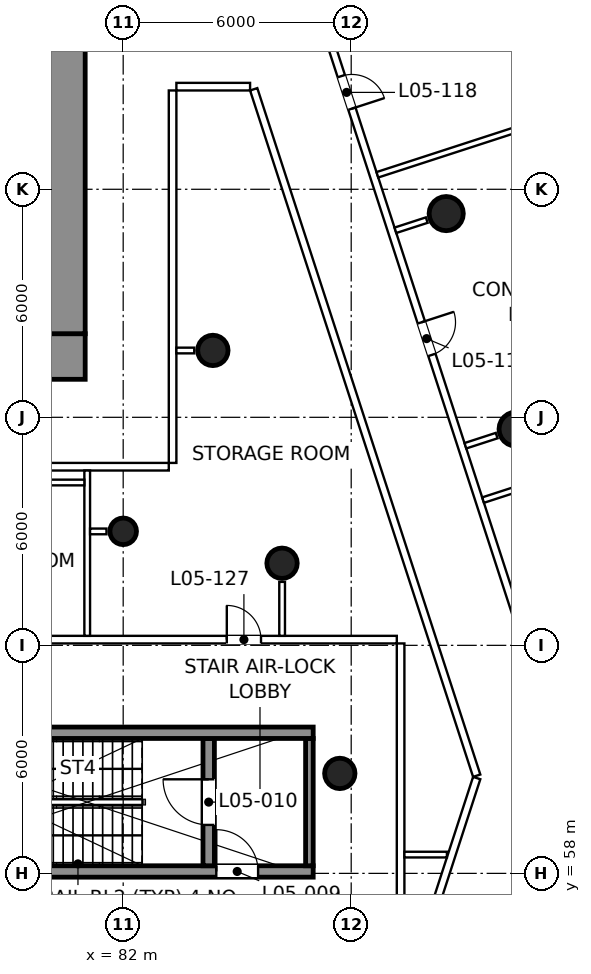
"""IFC4 building model, lengths in metres.
Left out: names, types, materials, properties, quantities, classifications, styles, units other than length and angle.
Written with IfcOpenShell. Run it as: python <this file> out.ifc"""

import sys

from ifc_helpers import new_model, si_unit, direction, frame, frame_2d, origin, origin_2d, place, context, subcontext, project, spatial, rectangle, circle, extrude, element, fill, save


model = new_model("IFC4")
c1 = context("Model", 3, precision=1e-05, world=origin(), true_north=direction((0.0, 1.0)))
c2 = subcontext(c1, "Body", "Model", "MODEL_VIEW")
j1 = project(units=[si_unit("LENGTHUNIT", "METRE"), si_unit("PLANEANGLEUNIT", "RADIAN")], contexts=[c1])
p1 = place(None, origin())
s1 = spatial("IfcSite", under=j1, at=p1, CompositionType="ELEMENT")
p2 = place(p1, origin())
s2 = spatial("IfcBuilding", under=s1, at=p2, CompositionType="ELEMENT")
p3 = place(p2, frame((0.0, 0.0, 34.0)))
s3 = spatial("IfcBuildingStorey", under=s2, at=p3, CompositionType="ELEMENT", Elevation=34.0)
for number, where, z_axis, x_axis in (
    (1, (92.34, 69.69, 0.0), (0.0, 0.0, 1.0), (1.0, 0.0, 0.0)),
    (2, (90.5, 75.36, 0.0), (0.0, 0.0, 1.0), (1.0, 0.0, 0.0)),
):
    element("IfcColumn", number, at=place(p3, frame(where, z_axis=z_axis, x_axis=x_axis)), inside=s3, PredefinedType="COLUMN", context=c2, shape_type="SweptSolid", body=[
        extrude(circle(Radius=0.45, at=origin_2d()), origin(), (0.0, 0.0, 1.0), 5.0),
    ])
for number, where, z_axis, x_axis in (
    (3, (87.7, 60.63, 0.0), (0.0, 0.0, 1.0), (1.0, 0.0, 0.0)),
    (4, (86.18, 66.16, 0.0), (0.0, 0.0, 1.0), (1.0, 0.0, 0.0)),
    (5, (84.36, 71.76, 0.0), (0.0, 0.0, 1.0), (1.0, 0.0, 0.0)),
):
    element("IfcColumn", number, at=place(p3, frame(where, z_axis=z_axis, x_axis=x_axis)), inside=s3, PredefinedType="COLUMN", context=c2, shape_type="SweptSolid", body=[
        extrude(circle(Radius=0.4, at=origin_2d()), origin(), (0.0, 0.0, 1.0), 5.0),
    ])
p4 = place(p3, frame((82.0, 67.0, 0.0), z_axis=(0.0, 0.0, 1.0), x_axis=(1.0, 0.0, 0.0)))
e6 = element("IfcColumn", 6, at=p4, inside=s3, PredefinedType="COLUMN", context=c2, shape_type="SweptSolid", body=[
    extrude(circle(Radius=0.35, at=origin_2d()), origin(), (0.0, 0.0, 1.0), 5.0),
])
p5 = place(p3, frame((75.1, 58.05, 0.0), z_axis=(0.0, 0.0, 1.0), x_axis=(1.0, 0.0, 0.0)))
e7 = element("IfcWall", 7, at=p5, inside=s3, PredefinedType="SHEAR", context=c2, shape_type="SweptSolid", body=[
    extrude(rectangle(XDim=11.9, YDim=0.3, at=frame_2d((5.95, 0.0))), origin(), (0.0, 0.0, 1.0), 5.0),
])
p6 = place(p5, frame((9.35, 0.0, 0.0)))
e8 = element("IfcOpeningElement", 8, at=p6, cuts=e7, PredefinedType="OPENING", context=c2, shape_type="SweptSolid", body=[
    extrude(rectangle(XDim=1.1, YDim=2.1, at=frame_2d((0.55, 1.05))), frame((0.0, 0.16, 0.0), z_axis=(0.0, -1.0, 0.0), x_axis=(1.0, 0.0, 0.0)), (0.0, 0.0, 1.0), 0.32),
])
p7 = place(p3, frame((84.25, 58.2, 0.0), z_axis=(0.0, 0.0, 1.0), x_axis=(0.0, 1.0, 0.0)))
e9 = element("IfcWall", 9, at=p7, inside=s3, PredefinedType="SHEAR", context=c2, shape_type="SweptSolid", body=[
    extrude(rectangle(XDim=3.35, YDim=0.3, at=frame_2d((1.675, 0.0))), origin(), (0.0, 0.0, 1.0), 5.0),
])
p8 = place(p7, frame((1.075, 0.0, 0.0)))
e10 = element("IfcOpeningElement", 10, at=p8, cuts=e9, PredefinedType="OPENING", context=c2, shape_type="SweptSolid", body=[
    extrude(rectangle(XDim=1.2, YDim=2.1, at=frame_2d((0.6, 1.05))), frame((0.0, 0.16, 0.0), z_axis=(0.0, -1.0, 0.0), x_axis=(1.0, 0.0, 0.0)), (0.0, 0.0, 1.0), 0.32),
])
p9 = place(p3, frame((86.9, 58.2, 0.0), z_axis=(0.0, 0.0, 1.0), x_axis=(0.0, 1.0, 0.0)))
e11 = element("IfcWall", 11, at=p9, inside=s3, PredefinedType="SHEAR", context=c2, shape_type="SweptSolid", body=[
    extrude(rectangle(XDim=3.35, YDim=0.2, at=frame_2d((1.675, 0.0))), origin(), (0.0, 0.0, 1.0), 5.0),
])
p10 = place(p3, frame((75.1, 61.7, 0.0), z_axis=(0.0, 0.0, 1.0), x_axis=(1.0, 0.0, 0.0)))
e12 = element("IfcWall", 12, at=p10, inside=s3, PredefinedType="SHEAR", context=c2, shape_type="SweptSolid", body=[
    extrude(rectangle(XDim=11.9, YDim=0.3, at=frame_2d((5.95, 0.0))), origin(), (0.0, 0.0, 1.0), 5.0),
])
p11 = place(p3, frame((59.0, 71.6, 0.0), z_axis=(0.0, 0.0, 1.0), x_axis=(1.0, 0.0, 0.0)))
e13 = element("IfcWall", 13, at=p11, inside=s3, PredefinedType="SHEAR", context=c2, shape_type="SweptSolid", body=[
    extrude(rectangle(XDim=22.0, YDim=1.2, at=frame_2d((11.0, 0.0))), origin(), (0.0, 0.0, 1.0), 5.0),
])
p12 = place(p11, frame((2.025, 0.0, 0.0)))
e14 = element("IfcOpeningElement", 14, at=p12, cuts=e13, PredefinedType="OPENING", context=c2, shape_type="SweptSolid", body=[
    extrude(rectangle(XDim=1.2, YDim=2.1, at=frame_2d((0.6, 1.05))), frame((0.0, 0.61, 0.0), z_axis=(0.0, -1.0, 0.0), x_axis=(1.0, 0.0, 0.0)), (0.0, 0.0, 1.0), 1.22),
])
p13 = place(p11, frame((18.775, 0.0, 0.0)))
e15 = element("IfcOpeningElement", 15, at=p13, cuts=e13, PredefinedType="OPENING", context=c2, shape_type="SweptSolid", body=[
    extrude(rectangle(XDim=1.2, YDim=2.1, at=frame_2d((0.6, 1.05))), frame((0.0, 0.61, 0.0), z_axis=(0.0, -1.0, 0.0), x_axis=(1.0, 0.0, 0.0)), (0.0, 0.0, 1.0), 1.22),
])
p14 = place(p11, frame((10.0, 0.0, 0.0)))
e16 = element("IfcOpeningElement", 16, at=p14, cuts=e13, PredefinedType="OPENING", context=c2, shape_type="SweptSolid", body=[
    extrude(rectangle(XDim=2.0, YDim=2.1, at=frame_2d((1.0, 1.05))), frame((0.0, 0.61, 0.0), z_axis=(0.0, -1.0, 0.0), x_axis=(1.0, 0.0, 0.0)), (0.0, 0.0, 1.0), 1.22),
])
p15 = place(p11, frame((4.925, 0.0, 0.0)))
e17 = element("IfcOpeningElement", 17, at=p15, cuts=e13, PredefinedType="OPENING", context=c2, shape_type="SweptSolid", body=[
    extrude(rectangle(XDim=1.1, YDim=2.1, at=frame_2d((0.55, 1.05))), frame((0.0, 0.61, 0.0), z_axis=(0.0, -1.0, 0.0), x_axis=(1.0, 0.0, 0.0)), (0.0, 0.0, 1.0), 1.22),
])
p16 = place(p11, frame((7.575, 0.0, 0.0)))
e18 = element("IfcOpeningElement", 18, at=p16, cuts=e13, PredefinedType="OPENING", context=c2, shape_type="SweptSolid", body=[
    extrude(rectangle(XDim=1.1, YDim=2.1, at=frame_2d((0.55, 1.05))), frame((0.0, 0.61, 0.0), z_axis=(0.0, -1.0, 0.0), x_axis=(1.0, 0.0, 0.0)), (0.0, 0.0, 1.0), 1.22),
])
p17 = place(p11, frame((13.125, 0.0, 0.0)))
e19 = element("IfcOpeningElement", 19, at=p17, cuts=e13, PredefinedType="OPENING", context=c2, shape_type="SweptSolid", body=[
    extrude(rectangle(XDim=1.1, YDim=2.1, at=frame_2d((0.55, 1.05))), frame((0.0, 0.61, 0.0), z_axis=(0.0, -1.0, 0.0), x_axis=(1.0, 0.0, 0.0)), (0.0, 0.0, 1.0), 1.22),
])
p18 = place(p11, frame((15.775, 0.0, 0.0)))
e20 = element("IfcOpeningElement", 20, at=p18, cuts=e13, PredefinedType="OPENING", context=c2, shape_type="SweptSolid", body=[
    extrude(rectangle(XDim=1.1, YDim=2.1, at=frame_2d((0.55, 1.05))), frame((0.0, 0.61, 0.0), z_axis=(0.0, -1.0, 0.0), x_axis=(1.0, 0.0, 0.0)), (0.0, 0.0, 1.0), 1.22),
])
p19 = place(p3, frame((80.4, 72.2, 0.0), z_axis=(0.0, 0.0, 1.0), x_axis=(0.0, 1.0, 0.0)))
e21 = element("IfcWall", 21, at=p19, inside=s3, PredefinedType="SHEAR", context=c2, shape_type="SweptSolid", body=[
    extrude(rectangle(XDim=8.7, YDim=1.2, at=frame_2d((4.35, 0.0))), origin(), (0.0, 0.0, 1.0), 5.0),
])
p20 = place(p3, frame((87.105, 80.931, 0.0), z_axis=(0.0, 0.0, 1.0), x_axis=(0.309020575415, -0.951055352737, 0.0)))
e22 = element("IfcWall", 22, at=p20, inside=s3, PredefinedType="PARTITIONING", context=c2, shape_type="SweptSolid", body=[
    extrude(rectangle(XDim=21.409, YDim=0.2, at=frame_2d((10.704, 0.0))), origin(), (0.0, 0.0, 1.0), 3.9),
])
p21 = place(p20, frame((17.129, 0.0, 0.0)))
e23 = element("IfcOpeningElement", 23, at=p21, cuts=e22, PredefinedType="OPENING", context=c2, shape_type="SweptSolid", body=[
    extrude(rectangle(XDim=0.9, YDim=2.1, at=frame_2d((0.45, 1.05))), frame((0.0, 0.11, 0.0), z_axis=(0.0, -1.0, 0.0), x_axis=(1.0, 0.0, 0.0)), (0.0, 0.0, 1.0), 0.22),
])
p22 = place(p20, frame((8.866, 0.0, 0.0)))
e24 = element("IfcOpeningElement", 24, at=p22, cuts=e22, PredefinedType="OPENING", context=c2, shape_type="SweptSolid", body=[
    extrude(rectangle(XDim=0.9, YDim=2.1, at=frame_2d((0.45, 1.05))), frame((0.0, 0.11, 0.0), z_axis=(0.0, -1.0, 0.0), x_axis=(1.0, 0.0, 0.0)), (0.0, 0.0, 1.0), 0.22),
])
p23 = place(p20, frame((2.054, 0.0, 0.0)))
e25 = element("IfcOpeningElement", 25, at=p23, cuts=e22, PredefinedType="OPENING", context=c2, shape_type="SweptSolid", body=[
    extrude(rectangle(XDim=0.9, YDim=2.1, at=frame_2d((0.45, 1.05))), frame((0.0, 0.11, 0.0), z_axis=(0.0, -1.0, 0.0), x_axis=(1.0, 0.0, 0.0)), (0.0, 0.0, 1.0), 0.22),
])
p24 = place(p3, frame((93.721, 60.508, 0.0), z_axis=(0.0, 0.0, 1.0), x_axis=(-0.309030308026, -0.951052190325, 0.0)))
e26 = element("IfcWall", 26, at=p24, inside=s3, PredefinedType="PARTITIONING", context=c2, shape_type="SweptSolid", body=[
    extrude(rectangle(XDim=8.019, YDim=0.2, at=frame_2d((4.009, 0.0))), origin(), (0.0, 0.0, 1.0), 4.1),
])
p25 = place(p24, frame((4.83, 0.0, 0.0)))
e27 = element("IfcOpeningElement", 27, at=p25, cuts=e26, PredefinedType="OPENING", context=c2, shape_type="SweptSolid", body=[
    extrude(rectangle(XDim=0.9, YDim=2.1, at=frame_2d((0.45, 1.05))), frame((0.0, 0.11, 0.0), z_axis=(0.0, -1.0, 0.0), x_axis=(1.0, 0.0, 0.0)), (0.0, 0.0, 1.0), 0.22),
])
p26 = place(p24, frame((0.788, 0.0, 0.0)))
e28 = element("IfcOpeningElement", 28, at=p26, cuts=e26, PredefinedType="OPENING", context=c2, shape_type="SweptSolid", body=[
    extrude(rectangle(XDim=0.9, YDim=2.1, at=frame_2d((0.45, 1.05))), frame((0.0, 0.11, 0.0), z_axis=(0.0, -1.0, 0.0), x_axis=(1.0, 0.0, 0.0)), (0.0, 0.0, 1.0), 0.22),
])
p27 = place(p3, frame((89.287, 54.304, 0.0), z_axis=(0.0, 0.0, 1.0), x_axis=(0.308999759659, 0.951062116021, 0.0)))
e29 = element("IfcWall", 29, at=p27, inside=s3, PredefinedType="PARTITIONING", context=c2, shape_type="SweptSolid", body=[
    extrude(rectangle(XDim=6.524, YDim=0.2, at=frame_2d((3.262, 0.0))), origin(), (0.0, 0.0, 1.0), 4.6),
])
p28 = place(p3, frame((91.302, 60.57, 0.0), z_axis=(0.0, 0.0, 1.0), x_axis=(-0.309021827521, 0.951054945897, 0.0)))
e30 = element("IfcWall", 30, at=p28, inside=s3, PredefinedType="PARTITIONING", context=c2, shape_type="SweptSolid", body=[
    extrude(rectangle(XDim=18.99, YDim=0.2, at=frame_2d((9.495, 0.0))), origin(), (0.0, 0.0, 1.0), 4.6),
])
p29 = place(p3, frame((85.339, 78.7, 0.0), z_axis=(0.0, 0.0, 1.0), x_axis=(-1.0, 0.0, 0.0)))
e31 = element("IfcWall", 31, at=p29, inside=s3, PredefinedType="PARTITIONING", context=c2, shape_type="SweptSolid", body=[
    extrude(rectangle(XDim=1.939, YDim=0.2, at=frame_2d((0.97, 0.0))), origin(), (0.0, 0.0, 1.0), 4.6),
])
p30 = place(p3, frame((83.3, 78.6, 0.0), z_axis=(0.0, 0.0, 1.0), x_axis=(0.0, -1.0, 0.0)))
e32 = element("IfcWall", 32, at=p30, inside=s3, PredefinedType="PARTITIONING", context=c2, shape_type="SweptSolid", body=[
    extrude(rectangle(XDim=9.8, YDim=0.2, at=frame_2d((4.9, 0.0))), origin(), (0.0, 0.0, 1.0), 4.0),
])
p31 = place(p3, frame((83.2, 68.7, 0.0), z_axis=(0.0, 0.0, 1.0), x_axis=(-1.0, 0.0, 0.0)))
e33 = element("IfcWall", 33, at=p31, inside=s3, PredefinedType="PARTITIONING", context=c2, shape_type="SweptSolid", body=[
    extrude(rectangle(XDim=11.95, YDim=0.2, at=frame_2d((5.975, 0.0))), origin(), (0.0, 0.0, 1.0), 4.6),
])
p32 = place(p3, frame((72.9, 64.15, 0.0), z_axis=(0.0, 0.0, 1.0), x_axis=(1.0, 0.0, 0.0)))
e34 = element("IfcWall", 34, at=p32, inside=s3, PredefinedType="PARTITIONING", context=c2, shape_type="SweptSolid", body=[
    extrude(rectangle(XDim=16.3, YDim=0.2, at=frame_2d((8.15, 0.0))), origin(), (0.0, 0.0, 1.0), 4.0),
])
p33 = place(p32, frame((11.827, 0.0, 0.0)))
e35 = element("IfcOpeningElement", 35, at=p33, cuts=e34, PredefinedType="OPENING", context=c2, shape_type="SweptSolid", body=[
    extrude(rectangle(XDim=0.9, YDim=2.1, at=frame_2d((0.45, 1.05))), frame((0.0, 0.11, 0.0), z_axis=(0.0, -1.0, 0.0), x_axis=(1.0, 0.0, 0.0)), (0.0, 0.0, 1.0), 0.22),
])
p34 = place(p3, frame((89.3, 64.05, 0.0), z_axis=(0.0, 0.0, 1.0), x_axis=(0.0, -1.0, 0.0)))
e36 = element("IfcWall", 36, at=p34, inside=s3, PredefinedType="PARTITIONING", context=c2, shape_type="SweptSolid", body=[
    extrude(rectangle(XDim=8.35, YDim=0.2, at=frame_2d((4.175, 0.0))), origin(), (0.0, 0.0, 1.0), 4.6),
])
p35 = place(p3, frame((97.728, 69.855, 0.0), z_axis=(0.0, 0.0, 1.0), x_axis=(-0.951049337045, -0.309039088961, 0.0)))
e37 = element("IfcWall", 37, at=p35, inside=s3, PredefinedType="PARTITIONING", context=c2, shape_type="SweptSolid", body=[
    extrude(rectangle(XDim=6.58, YDim=0.15, at=frame_2d((3.29, 0.0))), origin(), (0.0, 0.0, 1.0), 4.1),
])
p36 = place(p3, frame((94.947, 78.414, 0.0), z_axis=(0.0, 0.0, 1.0), x_axis=(-0.951063784568, -0.308994624035, 0.0)))
e38 = element("IfcWall", 38, at=p36, inside=s3, PredefinedType="PARTITIONING", context=c2, shape_type="SweptSolid", body=[
    extrude(rectangle(XDim=6.58, YDim=0.15, at=frame_2d((3.29, 0.0))), origin(), (0.0, 0.0, 1.0), 3.9),
])
p37 = place(p3, frame((81.053, 64.25, 0.0), z_axis=(0.0, 0.0, 1.0), x_axis=(0.0, 1.0, 0.0)))
e39 = element("IfcWall", 39, at=p37, inside=s3, PredefinedType="PARTITIONING", context=c2, shape_type="SweptSolid", body=[
    extrude(rectangle(XDim=4.35, YDim=0.15, at=frame_2d((2.175, 0.0))), origin(), (0.0, 0.0, 1.0), 4.6),
])
p38 = place(p3, frame((89.4, 58.494, 0.0), z_axis=(0.0, 0.0, 1.0), x_axis=(1.0, 0.0, 0.0)))
e40 = element("IfcWall", 40, at=p38, inside=s3, PredefinedType="PARTITIONING", context=c2, shape_type="SweptSolid", body=[
    extrude(rectangle(XDim=1.119, YDim=0.15, at=frame_2d((0.559, 0.0))), origin(), (0.0, 0.0, 1.0), 4.6),
])
p39 = place(p3, frame((71.25, 68.285, 0.0), z_axis=(0.0, 0.0, 1.0), x_axis=(1.0, 0.0, 0.0)))
e41 = element("IfcWall", 41, at=p39, inside=s3, PredefinedType="PARTITIONING", context=c2, shape_type="SweptSolid", body=[
    extrude(rectangle(XDim=9.729, YDim=0.15, at=frame_2d((4.864, 0.0))), origin(), (0.0, 0.0, 1.0), 4.6),
])
p40 = place(p3, frame((91.828, 69.519, 0.0), z_axis=(0.0, 0.0, 1.0), x_axis=(-0.95113772004, -0.308766963123, 0.0)))
e42 = element("IfcWall", 42, at=p40, inside=s3, PredefinedType="PARTITIONING", context=c2, shape_type="SweptSolid", body=[
    extrude(rectangle(XDim=0.865, YDim=0.15, at=frame_2d((0.433, 0.0))), origin(), (0.0, 0.0, 1.0), 4.6),
])
p41 = place(p3, frame((89.988, 75.189, 0.0), z_axis=(0.0, 0.0, 1.0), x_axis=(-0.95102165437, -0.309124267762, 0.0)))
e43 = element("IfcWall", 43, at=p41, inside=s3, PredefinedType="PARTITIONING", context=c2, shape_type="SweptSolid", body=[
    extrude(rectangle(XDim=0.867, YDim=0.15, at=frame_2d((0.434, 0.0))), origin(), (0.0, 0.0, 1.0), 4.6),
])
p42 = place(p3, frame((86.182, 65.67, 0.0), z_axis=(0.0, 0.0, 1.0), x_axis=(0.0, -1.0, 0.0)))
e44 = element("IfcWall", 44, at=p42, inside=s3, PredefinedType="PARTITIONING", context=c2, shape_type="SweptSolid", body=[
    extrude(rectangle(XDim=1.42, YDim=0.15, at=frame_2d((0.71, 0.0))), origin(), (0.0, 0.0, 1.0), 4.0),
])
p43 = place(p3, frame((83.87, 71.758, 0.0), z_axis=(0.0, 0.0, 1.0), x_axis=(-1.0, 0.0, 0.0)))
e45 = element("IfcWall", 45, at=p43, inside=s3, PredefinedType="PARTITIONING", context=c2, shape_type="SweptSolid", body=[
    extrude(rectangle(XDim=0.47, YDim=0.15, at=frame_2d((0.235, 0.0))), origin(), (0.0, 0.0, 1.0), 4.0),
])
p44 = place(p3, frame((81.56, 66.998, 0.0), z_axis=(0.0, 0.0, 1.0), x_axis=(-1.0, 0.0, 0.0)))
e46 = element("IfcWall", 46, at=p44, inside=s3, PredefinedType="PARTITIONING", context=c2, shape_type="SweptSolid", body=[
    extrude(rectangle(XDim=0.432, YDim=0.15, at=frame_2d((0.216, 0.0))), origin(), (0.0, 0.0, 1.0), 4.6),
])
p45 = place(p6, origin())
e47 = element("IfcDoor", 47, at=p45, inside=s3, OperationType="SINGLE_SWING_LEFT", PredefinedType="DOOR", context=c2, shape_type="SweptSolid", body=[
    extrude(rectangle(XDim=1.1, YDim=2.1, at=frame_2d((0.55, 1.05))), frame((0.0, 0.025, 0.0), z_axis=(0.0, -1.0, 0.0), x_axis=(1.0, 0.0, 0.0)), (0.0, 0.0, 1.0), 0.05),
])
fill(e8, e47)
p46 = place(p8, origin())
e48 = element("IfcDoor", 48, at=p46, inside=s3, OperationType="SINGLE_SWING_RIGHT", PredefinedType="DOOR", context=c2, shape_type="SweptSolid", body=[
    extrude(rectangle(XDim=1.2, YDim=2.1, at=frame_2d((0.6, 1.05))), frame((0.0, 0.025, 0.0), z_axis=(0.0, -1.0, 0.0), x_axis=(1.0, 0.0, 0.0)), (0.0, 0.0, 1.0), 0.05),
])
fill(e10, e48)
p47 = place(p22, origin())
e49 = element("IfcDoor", 49, at=p47, inside=s3, OperationType="SINGLE_SWING_LEFT", PredefinedType="DOOR", context=c2, shape_type="SweptSolid", body=[
    extrude(rectangle(XDim=0.9, YDim=2.1, at=frame_2d((0.45, 1.05))), frame((0.0, 0.025, 0.0), z_axis=(0.0, -1.0, 0.0), x_axis=(1.0, 0.0, 0.0)), (0.0, 0.0, 1.0), 0.05),
])
fill(e24, e49)
p48 = place(p23, origin())
e50 = element("IfcDoor", 50, at=p48, inside=s3, OperationType="SINGLE_SWING_RIGHT", PredefinedType="DOOR", context=c2, shape_type="SweptSolid", body=[
    extrude(rectangle(XDim=0.9, YDim=2.1, at=frame_2d((0.45, 1.05))), frame((0.0, 0.025, 0.0), z_axis=(0.0, -1.0, 0.0), x_axis=(1.0, 0.0, 0.0)), (0.0, 0.0, 1.0), 0.05),
])
fill(e25, e50)
p49 = place(p33, origin())
e51 = element("IfcDoor", 51, at=p49, inside=s3, OperationType="SINGLE_SWING_LEFT", PredefinedType="DOOR", context=c2, shape_type="SweptSolid", body=[
    extrude(rectangle(XDim=0.9, YDim=2.1, at=frame_2d((0.45, 1.05))), frame((0.0, 0.025, 0.0), z_axis=(0.0, -1.0, 0.0), x_axis=(1.0, 0.0, 0.0)), (0.0, 0.0, 1.0), 0.05),
])
fill(e35, e51)
save(model, sys.argv[1])
